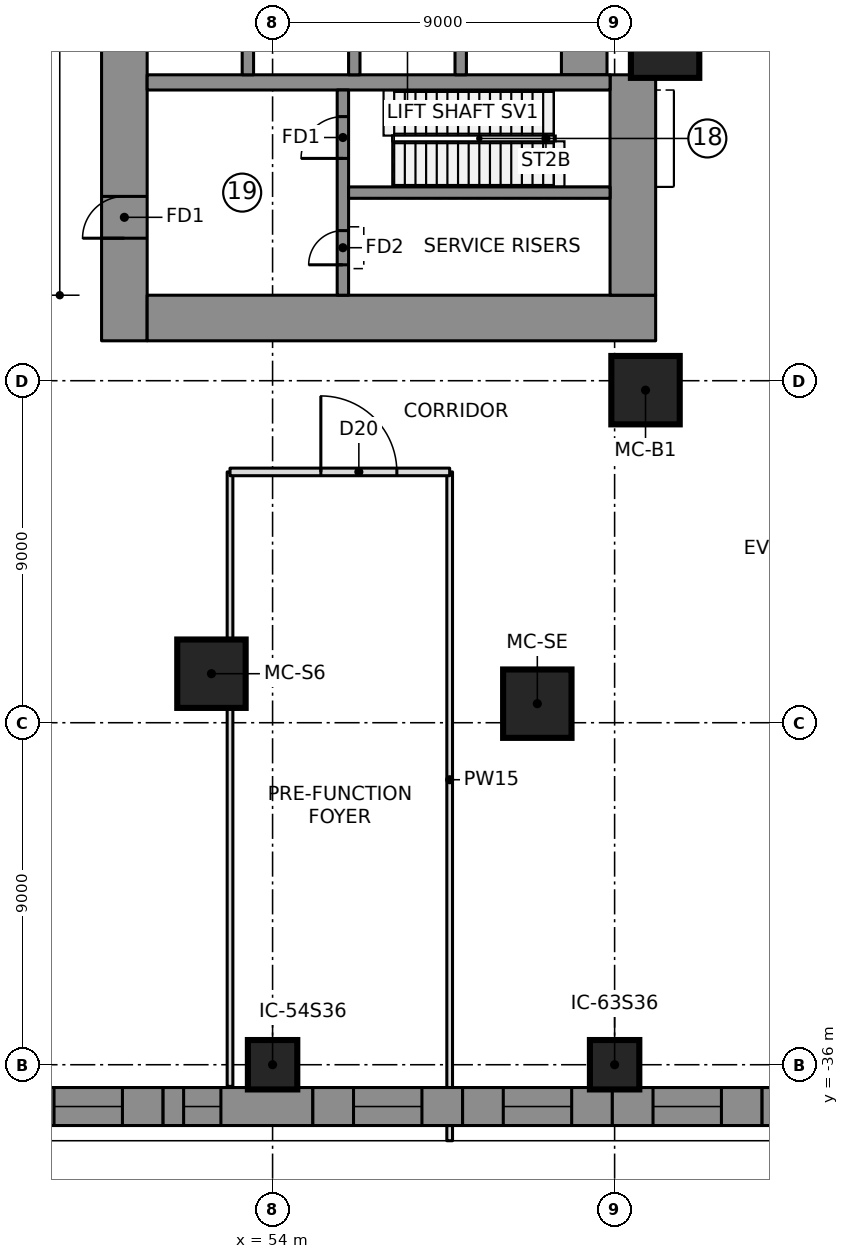
"""IFC4 building model, lengths in metres.
Left out: names, types, materials, properties, quantities, classifications, styles, units other than length and angle.
Written with IfcOpenShell. Run it as: python <this file> out.ifc"""

import sys

from ifc_helpers import new_model, si_unit, direction, frame, frame_2d, origin, origin_2d, place, context, subcontext, project, spatial, polyline, rectangle, outline, extrude, element, fill, save


model = new_model("IFC4")
c1 = context("Model", 3, precision=1e-05, world=origin(), true_north=direction((0.0, 1.0)))
c2 = subcontext(c1, "Body", "Model", "MODEL_VIEW")
j1 = project(units=[si_unit("LENGTHUNIT", "METRE"), si_unit("PLANEANGLEUNIT", "RADIAN")], contexts=[c1])
p1 = place(None, origin())
s1 = spatial("IfcSite", under=j1, at=p1, CompositionType="ELEMENT")
p2 = place(p1, origin())
s2 = spatial("IfcBuilding", under=s1, at=p2, CompositionType="ELEMENT")
p3 = place(p2, frame((0.0, 0.0, 8.0)))
s3 = spatial("IfcBuildingStorey", under=s2, at=p3, CompositionType="ELEMENT", Elevation=8.0)
p4 = place(p3, frame((50.1, -16.95, 0.0), z_axis=(0.0, 0.0, 1.0), x_axis=(0.0, 1.0, 0.0)))
e1 = element("IfcWall", 1, at=p4, inside=s3, PredefinedType="SHEAR", context=c2, shape_type="SweptSolid", body=[
    extrude(rectangle(XDim=10.3, YDim=1.2, at=frame_2d((5.15, 0.0))), origin(), (0.0, 0.0, 1.0), 5.5),
])
p5 = place(p4, frame((2.7, 0.0, 0.0)))
e2 = element("IfcOpeningElement", 2, at=p5, cuts=e1, PredefinedType="OPENING", context=c2, shape_type="SweptSolid", body=[
    extrude(rectangle(XDim=1.1, YDim=2.1, at=frame_2d((0.55, 1.05))), frame((0.0, 0.61, 0.0), z_axis=(0.0, -1.0, 0.0), x_axis=(1.0, 0.0, 0.0)), (0.0, 0.0, 1.0), 1.22),
])
p6 = place(p3, frame((50.7, -16.35, 0.0), z_axis=(0.0, 0.0, 1.0), x_axis=(1.0, 0.0, 0.0)))
e3 = element("IfcWall", 3, at=p6, inside=s3, PredefinedType="SHEAR", context=c2, shape_type="SweptSolid", body=[
    extrude(rectangle(XDim=13.38, YDim=1.2, at=frame_2d((6.69, 0.0))), origin(), (0.0, 0.0, 1.0), 5.5),
])
p7 = place(p3, frame((63.48, -15.75, 0.0), z_axis=(0.0, 0.0, 1.0), x_axis=(0.0, 1.0, 0.0)))
e4 = element("IfcWall", 4, at=p7, inside=s3, PredefinedType="SHEAR", context=c2, shape_type="SweptSolid", body=[
    extrude(rectangle(XDim=5.8, YDim=1.2, at=frame_2d((2.9, 0.0))), origin(), (0.0, 0.0, 1.0), 5.5),
])
p8 = place(p3, frame((62.2, -9.95, 0.0), z_axis=(0.0, 0.0, 1.0), x_axis=(0.0, 1.0, 0.0)))
e5 = element("IfcWall", 5, at=p8, inside=s3, PredefinedType="SHEAR", context=c2, shape_type="SweptSolid", body=[
    extrude(rectangle(XDim=19.9, YDim=1.2, at=frame_2d((9.95, 0.0))), origin(), (0.0, 0.0, 1.0), 5.5),
])
p9 = place(p3, frame((50.7, -10.15, 0.0), z_axis=(0.0, 0.0, 1.0), x_axis=(1.0, 0.0, 0.0)))
e6 = element("IfcWall", 6, at=p9, inside=s3, PredefinedType="SHEAR", context=c2, shape_type="SweptSolid", body=[
    extrude(rectangle(XDim=12.18, YDim=0.4, at=frame_2d((6.09, 0.0))), origin(), (0.0, 0.0, 1.0), 5.5),
])
for number, where, z_axis, x_axis in (
    (7, (53.35, -9.95, 0.0), (0.0, 0.0, 1.0), (0.0, 1.0, 0.0)),
    (8, (56.15, -9.95, 0.0), (0.0, 0.0, 1.0), (0.0, 1.0, 0.0)),
    (9, (58.95, -9.95, 0.0), (0.0, 0.0, 1.0), (0.0, 1.0, 0.0)),
):
    element("IfcWall", number, at=place(p3, frame(where, z_axis=z_axis, x_axis=x_axis)), inside=s3, PredefinedType="SHEAR", context=c2, shape_type="SweptSolid", body=[
        extrude(rectangle(XDim=3.0, YDim=0.3, at=frame_2d((1.5, 0.0))), origin(), (0.0, 0.0, 1.0), 5.5),
    ])
p10 = place(p3, frame((55.85, -15.75, 0.0), z_axis=(0.0, 0.0, 1.0), x_axis=(0.0, 1.0, 0.0)))
e10 = element("IfcWall", 10, at=p10, inside=s3, PredefinedType="SHEAR", context=c2, shape_type="SweptSolid", body=[
    extrude(rectangle(XDim=5.4, YDim=0.3, at=frame_2d((2.7, 0.0))), origin(), (0.0, 0.0, 1.0), 5.5),
])
p11 = place(p10, frame((3.6, 0.0, 0.0)))
e11 = element("IfcOpeningElement", 11, at=p11, cuts=e10, PredefinedType="OPENING", context=c2, shape_type="SweptSolid", body=[
    extrude(rectangle(XDim=1.1, YDim=2.1, at=frame_2d((0.55, 1.05))), frame((0.0, 0.16, 0.0), z_axis=(0.0, -1.0, 0.0), x_axis=(1.0, 0.0, 0.0)), (0.0, 0.0, 1.0), 0.32),
])
p12 = place(p10, frame((0.8, 0.0, 0.0)))
e12 = element("IfcOpeningElement", 12, at=p12, cuts=e10, PredefinedType="OPENING", context=c2, shape_type="SweptSolid", body=[
    extrude(rectangle(XDim=0.9, YDim=2.1, at=frame_2d((0.45, 1.05))), frame((0.0, 0.16, 0.0), z_axis=(0.0, -1.0, 0.0), x_axis=(1.0, 0.0, 0.0)), (0.0, 0.0, 1.0), 0.32),
])
p13 = place(p3, frame((56.0, -13.05, 0.0), z_axis=(0.0, 0.0, 1.0), x_axis=(1.0, 0.0, 0.0)))
e13 = element("IfcWall", 13, at=p13, inside=s3, PredefinedType="SHEAR", context=c2, shape_type="SweptSolid", body=[
    extrude(rectangle(XDim=6.88, YDim=0.3, at=frame_2d((3.44, 0.0))), origin(), (0.0, 0.0, 1.0), 5.5),
])
for number, where, z_axis, x_axis in (
    (14, (52.392, -25.71, 0.0), (0.0, 0.0, 1.0), (1.0, 0.0, 0.0)),
    (15, (60.966, -26.499, 0.0), (0.0, 0.0, 1.0), (1.0, 0.0, 0.0)),
    (16, (63.813, -18.249, 0.0), (0.0, 0.0, 1.0), (1.0, 0.0, 0.0)),
    (17, (64.328, -9.131, 0.0), (0.0, 0.0, 1.0), (1.0, 0.0, 0.0)),
):
    element("IfcColumn", number, at=place(p3, frame(where, z_axis=z_axis, x_axis=x_axis)), inside=s3, PredefinedType="COLUMN", context=c2, shape_type="SweptSolid", body=[
        extrude(rectangle(XDim=1.8, YDim=1.8, at=origin_2d()), origin(), (0.0, 0.0, 1.0), 5.5),
    ])
for number, where, z_axis, x_axis in (
    (18, (54.0, -36.0, 0.0), (0.0, 0.0, 1.0), (1.0, 0.0, 0.0)),
    (19, (63.0, -36.0, 0.0), (0.0, 0.0, 1.0), (1.0, 0.0, 0.0)),
):
    element("IfcColumn", number, at=place(p3, frame(where, z_axis=z_axis, x_axis=x_axis)), inside=s3, PredefinedType="COLUMN", context=c2, shape_type="SweptSolid", body=[
        extrude(rectangle(XDim=1.3, YDim=1.3, at=origin_2d()), origin(), (0.0, 0.0, 1.0), 5.5),
    ])
p14 = place(p3, frame((47.179, -37.1, 0.0), z_axis=(0.0, 0.0, 1.0), x_axis=(1.0, 0.0, 0.0)))
e20 = element("IfcWall", 20, at=p14, inside=s3, PredefinedType="NOTDEFINED", context=c2, shape_type="SweptSolid", body=[
    extrude(outline(polyline([(-0.1, -0.5), (3.94, -0.5), (3.94, 0.5), (0.1, 0.5), (-0.1, -0.5)])), origin(), (0.0, 0.0, 1.0), 5.2),
])
p15 = place(p14, frame((1.07, 0.0, 0.9)))
e21 = element("IfcOpeningElement", 21, at=p15, cuts=e20, PredefinedType="OPENING", context=c2, shape_type="SweptSolid", body=[
    extrude(rectangle(XDim=1.8, YDim=2.4, at=frame_2d((0.9, 1.2))), frame((0.0, 0.51, 0.0), z_axis=(0.0, -1.0, 0.0), x_axis=(1.0, 0.0, 0.0)), (0.0, 0.0, 1.0), 1.02),
])
p16 = place(p3, frame((51.119, -37.1, 0.0), z_axis=(0.0, 0.0, 1.0), x_axis=(1.0, 0.0, 0.0)))
e22 = element("IfcWall", 22, at=p16, inside=s3, PredefinedType="NOTDEFINED", context=c2, shape_type="SweptSolid", body=[
    extrude(outline(polyline([(0.0, -0.5), (3.94, -0.5), (3.94, 0.5), (0.0, 0.5), (0.0, -0.5)])), origin(), (0.0, 0.0, 1.0), 5.2),
])
p17 = place(p16, frame((0.54, 0.0, 0.9)))
e23 = element("IfcOpeningElement", 23, at=p17, cuts=e22, PredefinedType="OPENING", context=c2, shape_type="SweptSolid", body=[
    extrude(rectangle(XDim=0.981, YDim=2.4, at=frame_2d((0.49, 1.2))), frame((0.0, 0.51, 0.0), z_axis=(0.0, -1.0, 0.0), x_axis=(1.0, 0.0, 0.0)), (0.0, 0.0, 1.0), 1.02),
])
p18 = place(p3, frame((55.06, -37.1, 0.0), z_axis=(0.0, 0.0, 1.0), x_axis=(1.0, 0.0, 0.0)))
e24 = element("IfcWall", 24, at=p18, inside=s3, PredefinedType="NOTDEFINED", context=c2, shape_type="SweptSolid", body=[
    extrude(outline(polyline([(0.0, -0.5), (3.94, -0.5), (3.94, 0.5), (0.0, 0.5), (0.0, -0.5)])), origin(), (0.0, 0.0, 1.0), 5.2),
])
p19 = place(p18, frame((1.07, 0.0, 0.9)))
e25 = element("IfcOpeningElement", 25, at=p19, cuts=e24, PredefinedType="OPENING", context=c2, shape_type="SweptSolid", body=[
    extrude(rectangle(XDim=1.8, YDim=2.4, at=frame_2d((0.9, 1.2))), frame((0.0, 0.51, 0.0), z_axis=(0.0, -1.0, 0.0), x_axis=(1.0, 0.0, 0.0)), (0.0, 0.0, 1.0), 1.02),
])
p20 = place(p3, frame((59.0, -37.1, 0.0), z_axis=(0.0, 0.0, 1.0), x_axis=(1.0, 0.0, 0.0)))
e26 = element("IfcWall", 26, at=p20, inside=s3, PredefinedType="NOTDEFINED", context=c2, shape_type="SweptSolid", body=[
    extrude(outline(polyline([(0.0, -0.5), (3.94, -0.5), (3.94, 0.5), (0.0, 0.5), (0.0, -0.5)])), origin(), (0.0, 0.0, 1.0), 5.2),
])
p21 = place(p20, frame((1.07, 0.0, 0.9)))
e27 = element("IfcOpeningElement", 27, at=p21, cuts=e26, PredefinedType="OPENING", context=c2, shape_type="SweptSolid", body=[
    extrude(rectangle(XDim=1.8, YDim=2.4, at=frame_2d((0.9, 1.2))), frame((0.0, 0.51, 0.0), z_axis=(0.0, -1.0, 0.0), x_axis=(1.0, 0.0, 0.0)), (0.0, 0.0, 1.0), 1.02),
])
p22 = place(p3, frame((62.94, -37.1, 0.0), z_axis=(0.0, 0.0, 1.0), x_axis=(1.0, 0.0, 0.0)))
e28 = element("IfcWall", 28, at=p22, inside=s3, PredefinedType="NOTDEFINED", context=c2, shape_type="SweptSolid", body=[
    extrude(outline(polyline([(0.0, -0.5), (3.94, -0.5), (3.94, 0.5), (0.0, 0.5), (0.0, -0.5)])), origin(), (0.0, 0.0, 1.0), 5.2),
])
p23 = place(p22, frame((1.07, 0.0, 0.9)))
e29 = element("IfcOpeningElement", 29, at=p23, cuts=e28, PredefinedType="OPENING", context=c2, shape_type="SweptSolid", body=[
    extrude(rectangle(XDim=1.8, YDim=2.4, at=frame_2d((0.9, 1.2))), frame((0.0, 0.51, 0.0), z_axis=(0.0, -1.0, 0.0), x_axis=(1.0, 0.0, 0.0)), (0.0, 0.0, 1.0), 1.02),
])
p24 = place(p3, frame((66.881, -37.1, 0.0), z_axis=(0.0, 0.0, 1.0), x_axis=(1.0, 0.0, 0.0)))
e30 = element("IfcWall", 30, at=p24, inside=s3, PredefinedType="NOTDEFINED", context=c2, shape_type="SweptSolid", body=[
    extrude(outline(polyline([(0.0, -0.5), (4.04, -0.5), (3.841, 0.5), (0.0, 0.5), (0.0, -0.5)])), origin(), (0.0, 0.0, 1.0), 5.2),
])
p25 = place(p24, frame((1.07, 0.0, 0.9)))
e31 = element("IfcOpeningElement", 31, at=p25, cuts=e30, PredefinedType="OPENING", context=c2, shape_type="SweptSolid", body=[
    extrude(rectangle(XDim=1.8, YDim=2.4, at=frame_2d((0.9, 1.2))), frame((0.0, 0.51, 0.0), z_axis=(0.0, -1.0, 0.0), x_axis=(1.0, 0.0, 0.0)), (0.0, 0.0, 1.0), 1.02),
])
p26 = place(p3, frame((52.88, -36.57, 0.0), z_axis=(0.0, 0.0, 1.0), x_axis=(0.0, 1.0, 0.0)))
e32 = element("IfcWall", 32, at=p26, inside=s3, PredefinedType="PARTITIONING", context=c2, shape_type="SweptSolid", body=[
    extrude(rectangle(XDim=16.17, YDim=0.15, at=frame_2d((8.085, 0.0))), origin(), (0.0, 0.0, 1.0), 5.15),
])
p27 = place(p3, frame((58.66, -38.0, 0.0), z_axis=(0.0, 0.0, 1.0), x_axis=(0.0, 1.0, 0.0)))
e33 = element("IfcWall", 33, at=p27, inside=s3, PredefinedType="PARTITIONING", context=c2, shape_type="SweptSolid", body=[
    extrude(rectangle(XDim=0.4, YDim=0.15, at=frame_2d((0.2, 0.0))), origin(), (0.0, 0.0, 1.0), 5.15),
])
p28 = place(p3, frame((58.66, -36.6, 0.0), z_axis=(0.0, 0.0, 1.0), x_axis=(0.0, 1.0, 0.0)))
e34 = element("IfcWall", 34, at=p28, inside=s3, PredefinedType="PARTITIONING", context=c2, shape_type="SweptSolid", body=[
    extrude(rectangle(XDim=16.2, YDim=0.15, at=frame_2d((8.1, 0.0))), origin(), (0.0, 0.0, 1.0), 5.15),
])
p29 = place(p3, frame((52.88, -20.4, 0.0), z_axis=(0.0, 0.0, 1.0), x_axis=(1.0, 0.0, 0.0)))
e35 = element("IfcWall", 35, at=p29, inside=s3, PredefinedType="PARTITIONING", context=c2, shape_type="SweptSolid", body=[
    extrude(rectangle(XDim=5.78, YDim=0.2, at=frame_2d((2.89, 0.0))), origin(), (0.0, 0.0, 1.0), 5.15),
])
p30 = place(p29, frame((2.39, 0.0, 0.0)))
e36 = element("IfcOpeningElement", 36, at=p30, cuts=e35, PredefinedType="OPENING", context=c2, shape_type="SweptSolid", body=[
    extrude(rectangle(XDim=2.0, YDim=2.4, at=frame_2d((1.0, 1.2))), frame((0.0, 0.11, 0.0), z_axis=(0.0, -1.0, 0.0), x_axis=(1.0, 0.0, 0.0)), (0.0, 0.0, 1.0), 0.22),
])
p31 = place(p15, origin())
e37 = element("IfcWindow", 37, at=p31, inside=s3, PartitioningType="SINGLE_PANEL", PredefinedType="WINDOW", context=c2, shape_type="SweptSolid", body=[
    extrude(rectangle(XDim=1.8, YDim=2.4, at=frame_2d((0.9, 1.2))), frame((0.0, 0.5, 0.0), z_axis=(0.0, -1.0, 0.0), x_axis=(1.0, 0.0, 0.0)), (0.0, 0.0, 1.0), 0.06),
])
fill(e21, e37)
p32 = place(p17, origin())
e38 = element("IfcWindow", 38, at=p32, inside=s3, PartitioningType="SINGLE_PANEL", PredefinedType="WINDOW", context=c2, shape_type="SweptSolid", body=[
    extrude(rectangle(XDim=0.981, YDim=2.4, at=frame_2d((0.49, 1.2))), frame((0.0, 0.5, 0.0), z_axis=(0.0, -1.0, 0.0), x_axis=(1.0, 0.0, 0.0)), (0.0, 0.0, 1.0), 0.06),
])
fill(e23, e38)
p33 = place(p19, origin())
e39 = element("IfcWindow", 39, at=p33, inside=s3, PartitioningType="SINGLE_PANEL", PredefinedType="WINDOW", context=c2, shape_type="SweptSolid", body=[
    extrude(rectangle(XDim=1.8, YDim=2.4, at=frame_2d((0.9, 1.2))), frame((0.0, 0.5, 0.0), z_axis=(0.0, -1.0, 0.0), x_axis=(1.0, 0.0, 0.0)), (0.0, 0.0, 1.0), 0.06),
])
fill(e25, e39)
p34 = place(p21, origin())
e40 = element("IfcWindow", 40, at=p34, inside=s3, PartitioningType="SINGLE_PANEL", PredefinedType="WINDOW", context=c2, shape_type="SweptSolid", body=[
    extrude(rectangle(XDim=1.8, YDim=2.4, at=frame_2d((0.9, 1.2))), frame((0.0, 0.5, 0.0), z_axis=(0.0, -1.0, 0.0), x_axis=(1.0, 0.0, 0.0)), (0.0, 0.0, 1.0), 0.06),
])
fill(e27, e40)
p35 = place(p23, origin())
e41 = element("IfcWindow", 41, at=p35, inside=s3, PartitioningType="SINGLE_PANEL", PredefinedType="WINDOW", context=c2, shape_type="SweptSolid", body=[
    extrude(rectangle(XDim=1.8, YDim=2.4, at=frame_2d((0.9, 1.2))), frame((0.0, 0.5, 0.0), z_axis=(0.0, -1.0, 0.0), x_axis=(1.0, 0.0, 0.0)), (0.0, 0.0, 1.0), 0.06),
])
fill(e29, e41)
p36 = place(p30, origin())
e42 = element("IfcDoor", 42, at=p36, inside=s3, OperationType="DOUBLE_DOOR_SINGLE_SWING", PredefinedType="DOOR", context=c2, shape_type="SweptSolid", body=[
    extrude(rectangle(XDim=2.0, YDim=2.4, at=frame_2d((1.0, 1.2))), frame((0.0, 0.025, 0.0), z_axis=(0.0, -1.0, 0.0), x_axis=(1.0, 0.0, 0.0)), (0.0, 0.0, 1.0), 0.05),
])
fill(e36, e42)
p37 = place(p11, origin())
e43 = element("IfcDoor", 43, at=p37, inside=s3, OperationType="SINGLE_SWING_RIGHT", PredefinedType="DOOR", context=c2, shape_type="SweptSolid", body=[
    extrude(rectangle(XDim=1.1, YDim=2.1, at=frame_2d((0.55, 1.05))), frame((0.0, 0.025, 0.0), z_axis=(0.0, -1.0, 0.0), x_axis=(1.0, 0.0, 0.0)), (0.0, 0.0, 1.0), 0.05),
])
fill(e11, e43)
p38 = place(p5, origin())
e44 = element("IfcDoor", 44, at=p38, inside=s3, OperationType="SINGLE_SWING_RIGHT", PredefinedType="DOOR", context=c2, shape_type="SweptSolid", body=[
    extrude(rectangle(XDim=1.1, YDim=2.1, at=frame_2d((0.55, 1.05))), frame((0.0, 0.025, 0.0), z_axis=(0.0, -1.0, 0.0), x_axis=(1.0, 0.0, 0.0)), (0.0, 0.0, 1.0), 0.05),
])
fill(e2, e44)
p39 = place(p12, origin())
e45 = element("IfcDoor", 45, at=p39, inside=s3, OperationType="SINGLE_SWING_LEFT", PredefinedType="DOOR", context=c2, shape_type="SweptSolid", body=[
    extrude(rectangle(XDim=0.9, YDim=2.1, at=frame_2d((0.45, 1.05))), frame((0.0, 0.025, 0.0), z_axis=(0.0, -1.0, 0.0), x_axis=(1.0, 0.0, 0.0)), (0.0, 0.0, 1.0), 0.05),
])
fill(e12, e45)
save(model, sys.argv[1])
